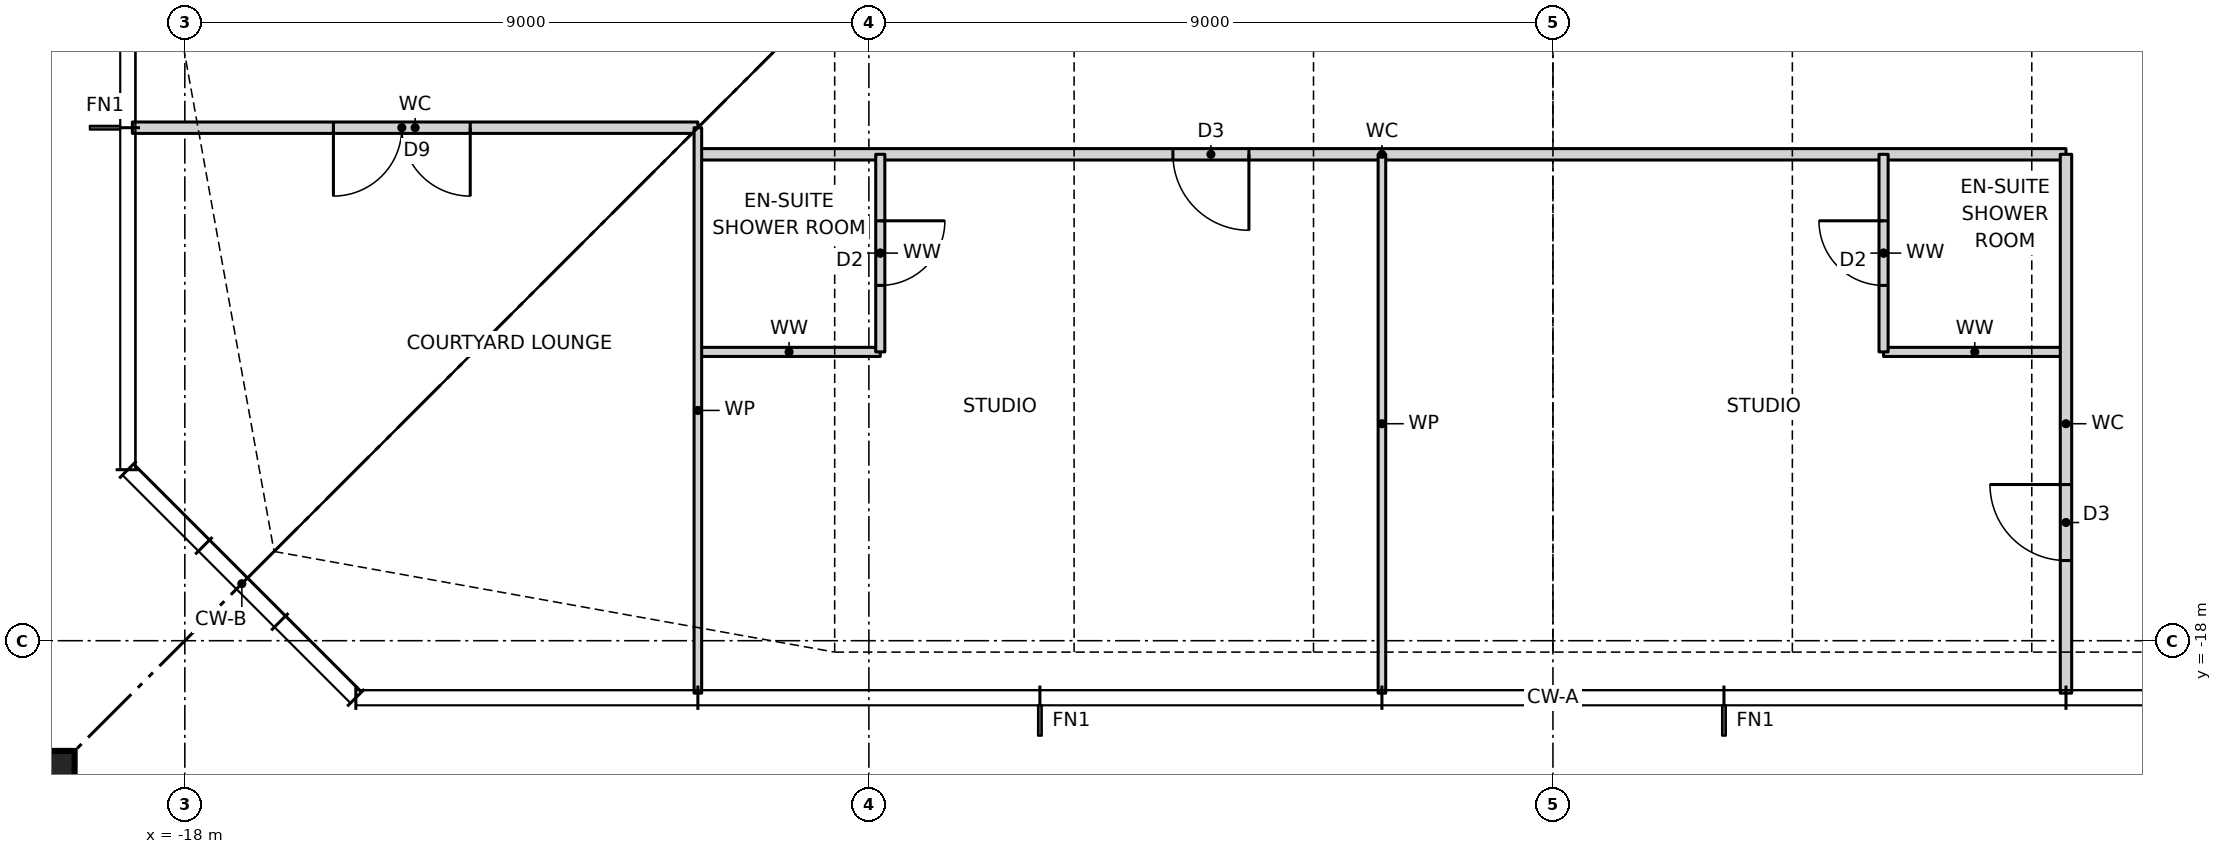
"""IFC4 building model, lengths in metres.
Left out: names, types, materials, properties, quantities, classifications, styles, units other than length and angle.
Written with IfcOpenShell. Run it as: python <this file> out.ifc"""

import sys

from ifc_helpers import new_model, si_unit, direction, frame, frame_2d, origin, origin_2d, place, context, subcontext, project, spatial, rectangle, i_section, extrude, element, fill, save


model = new_model("IFC4")
c1 = context("Model", 3, precision=1e-05, world=origin(), true_north=direction((0.0, 1.0)))
c2 = subcontext(c1, "Body", "Model", "MODEL_VIEW")
j1 = project(units=[si_unit("LENGTHUNIT", "METRE"), si_unit("PLANEANGLEUNIT", "RADIAN")], contexts=[c1])
p1 = place(None, origin())
s1 = spatial("IfcSite", under=j1, at=p1, CompositionType="ELEMENT")
p2 = place(p1, origin())
s2 = spatial("IfcBuilding", under=s1, at=p2, CompositionType="ELEMENT")
p3 = place(p2, frame((0.0, 0.0, 205.5)))
s3 = spatial("IfcBuildingStorey", under=s2, at=p3, CompositionType="ELEMENT", Elevation=205.5)
p4 = place(p3, frame((-21.65, -21.65, 0.0), z_axis=(0.0, 0.0, 1.0), x_axis=(1.0, 0.0, 0.0)))
e1 = element("IfcColumn", 1, at=p4, inside=s3, PredefinedType="COLUMN", context=c2, shape_type="SweptSolid", body=[
    extrude(rectangle(XDim=4.4, YDim=4.4, at=origin_2d()), origin(), (0.0, 0.0, 1.0), 3.5),
    extrude(i_section(OverallWidth=0.478, OverallDepth=0.599, WebThickness=0.1, FlangeThickness=0.14, at=origin_2d()), origin(), (0.0, 0.0, 1.0), 3.5),
])
for number, where, z_axis, x_axis in (
    (2, (-11.25, -14.2, 0.0), (0.0, 0.0, 1.0), (1.0, 0.0, 0.0)),
    (3, (4.35, -14.2, 0.0), (0.0, 0.0, 1.0), (1.0, 0.0, 0.0)),
):
    element("IfcWall", number, at=place(p3, frame(where, z_axis=z_axis, x_axis=x_axis)), inside=s3, PredefinedType="PARTITIONING", context=c2, shape_type="SweptSolid", body=[
        extrude(rectangle(XDim=2.4, YDim=0.12, at=frame_2d((1.2, 0.0))), origin(), (0.0, 0.0, 1.0), 3.2),
    ])
p5 = place(p3, frame((-11.25, -11.6, 0.0), z_axis=(0.0, 0.0, 1.0), x_axis=(1.0, 0.0, 0.0)))
e4 = element("IfcWall", 4, at=p5, inside=s3, PredefinedType="PARTITIONING", context=c2, shape_type="SweptSolid", body=[
    extrude(rectangle(XDim=18.0, YDim=0.15, at=frame_2d((9.0, 0.0))), origin(), (0.0, 0.0, 1.0), 3.2),
])
p6 = place(p5, frame((6.25, 0.0, 0.0)))
e5 = element("IfcOpeningElement", 5, at=p6, cuts=e4, PredefinedType="OPENING", context=c2, shape_type="SweptSolid", body=[
    extrude(rectangle(XDim=1.0, YDim=2.1, at=frame_2d((0.5, 1.05))), frame((0.0, 0.085, 0.0), z_axis=(0.0, -1.0, 0.0), x_axis=(1.0, 0.0, 0.0)), (0.0, 0.0, 1.0), 0.17),
])
p7 = place(p3, frame((-18.69, -11.25, 0.0), z_axis=(0.0, 0.0, 1.0), x_axis=(1.0, 0.0, 0.0)))
e6 = element("IfcWall", 6, at=p7, inside=s3, PredefinedType="PARTITIONING", context=c2, shape_type="SweptSolid", body=[
    extrude(rectangle(XDim=7.44, YDim=0.15, at=frame_2d((3.72, 0.0))), origin(), (0.0, 0.0, 1.0), 3.2),
])
p8 = place(p7, frame((2.645, 0.0, 0.0)))
e7 = element("IfcOpeningElement", 7, at=p8, cuts=e6, PredefinedType="OPENING", context=c2, shape_type="SweptSolid", body=[
    extrude(rectangle(XDim=1.8, YDim=2.1, at=frame_2d((0.9, 1.05))), frame((0.0, 0.085, 0.0), z_axis=(0.0, -1.0, 0.0), x_axis=(1.0, 0.0, 0.0)), (0.0, 0.0, 1.0), 0.17),
])
p9 = place(p3, frame((6.75, -18.69, 0.0), z_axis=(0.0, 0.0, 1.0), x_axis=(0.0, 1.0, 0.0)))
e8 = element("IfcWall", 8, at=p9, inside=s3, PredefinedType="PARTITIONING", context=c2, shape_type="SweptSolid", body=[
    extrude(rectangle(XDim=7.09, YDim=0.15, at=frame_2d((3.545, 0.0))), origin(), (0.0, 0.0, 1.0), 3.2),
])
p10 = place(p9, frame((1.745, 0.0, 0.0)))
e9 = element("IfcOpeningElement", 9, at=p10, cuts=e8, PredefinedType="OPENING", context=c2, shape_type="SweptSolid", body=[
    extrude(rectangle(XDim=1.0, YDim=2.1, at=frame_2d((0.5, 1.05))), frame((0.0, 0.085, 0.0), z_axis=(0.0, -1.0, 0.0), x_axis=(1.0, 0.0, 0.0)), (0.0, 0.0, 1.0), 0.17),
])
p11 = place(p3, frame((4.35, -14.2, 0.0), z_axis=(0.0, 0.0, 1.0), x_axis=(0.0, 1.0, 0.0)))
e10 = element("IfcWall", 10, at=p11, inside=s3, PredefinedType="PARTITIONING", context=c2, shape_type="SweptSolid", body=[
    extrude(rectangle(XDim=2.6, YDim=0.12, at=frame_2d((1.3, 0.0))), origin(), (0.0, 0.0, 1.0), 3.2),
])
p12 = place(p11, frame((0.875, 0.0, 0.0)))
e11 = element("IfcOpeningElement", 11, at=p12, cuts=e10, PredefinedType="OPENING", context=c2, shape_type="SweptSolid", body=[
    extrude(rectangle(XDim=0.85, YDim=2.1, at=frame_2d((0.425, 1.05))), frame((0.0, 0.07, 0.0), z_axis=(0.0, -1.0, 0.0), x_axis=(1.0, 0.0, 0.0)), (0.0, 0.0, 1.0), 0.14),
])
p13 = place(p3, frame((-2.25, -18.69, 0.0), z_axis=(0.0, 0.0, 1.0), x_axis=(0.0, 1.0, 0.0)))
e12 = element("IfcWall", 12, at=p13, inside=s3, PredefinedType="PARTITIONING", context=c2, shape_type="SweptSolid", body=[
    extrude(rectangle(XDim=7.09, YDim=0.1, at=frame_2d((3.545, 0.0))), origin(), (0.0, 0.0, 1.0), 3.2),
])
p14 = place(p3, frame((-8.85, -14.2, 0.0), z_axis=(0.0, 0.0, 1.0), x_axis=(0.0, 1.0, 0.0)))
e13 = element("IfcWall", 13, at=p14, inside=s3, PredefinedType="PARTITIONING", context=c2, shape_type="SweptSolid", body=[
    extrude(rectangle(XDim=2.6, YDim=0.12, at=frame_2d((1.3, 0.0))), origin(), (0.0, 0.0, 1.0), 3.2),
])
p15 = place(p14, frame((0.875, 0.0, 0.0)))
e14 = element("IfcOpeningElement", 14, at=p15, cuts=e13, PredefinedType="OPENING", context=c2, shape_type="SweptSolid", body=[
    extrude(rectangle(XDim=0.85, YDim=2.1, at=frame_2d((0.425, 1.05))), frame((0.0, 0.07, 0.0), z_axis=(0.0, -1.0, 0.0), x_axis=(1.0, 0.0, 0.0)), (0.0, 0.0, 1.0), 0.14),
])
p16 = place(p3, frame((-11.25, -18.69, 0.0), z_axis=(0.0, 0.0, 1.0), x_axis=(0.0, 1.0, 0.0)))
e15 = element("IfcWall", 15, at=p16, inside=s3, PredefinedType="PARTITIONING", context=c2, shape_type="SweptSolid", body=[
    extrude(rectangle(XDim=7.44, YDim=0.1, at=frame_2d((3.72, 0.0))), origin(), (0.0, 0.0, 1.0), 3.2),
])
p17 = place(p6, frame((1.0, 0.0, 0.0), z_axis=(0.0, 0.0, 1.0), x_axis=(-1.0, 0.0, 0.0)))
e16 = element("IfcDoor", 16, at=p17, inside=s3, OperationType="SINGLE_SWING_LEFT", PredefinedType="DOOR", context=c2, shape_type="SweptSolid", body=[
    extrude(rectangle(XDim=1.0, YDim=2.1, at=frame_2d((0.5, 1.05))), frame((0.0, 0.025, 0.0), z_axis=(0.0, -1.0, 0.0), x_axis=(1.0, 0.0, 0.0)), (0.0, 0.0, 1.0), 0.05),
])
fill(e5, e16)
p18 = place(p15, frame((0.85, 0.0, 0.0), z_axis=(0.0, 0.0, 1.0), x_axis=(-1.0, 0.0, 0.0)))
e17 = element("IfcDoor", 17, at=p18, inside=s3, OperationType="SINGLE_SWING_LEFT", PredefinedType="DOOR", context=c2, shape_type="SweptSolid", body=[
    extrude(rectangle(XDim=0.85, YDim=2.1, at=frame_2d((0.425, 1.05))), frame((0.0, 0.025, 0.0), z_axis=(0.0, -1.0, 0.0), x_axis=(1.0, 0.0, 0.0)), (0.0, 0.0, 1.0), 0.05),
])
fill(e14, e17)
p19 = place(p10, origin())
e18 = element("IfcDoor", 18, at=p19, inside=s3, OperationType="SINGLE_SWING_RIGHT", PredefinedType="DOOR", context=c2, shape_type="SweptSolid", body=[
    extrude(rectangle(XDim=1.0, YDim=2.1, at=frame_2d((0.5, 1.05))), frame((0.0, 0.025, 0.0), z_axis=(0.0, -1.0, 0.0), x_axis=(1.0, 0.0, 0.0)), (0.0, 0.0, 1.0), 0.05),
])
fill(e9, e18)
p20 = place(p12, origin())
e19 = element("IfcDoor", 19, at=p20, inside=s3, OperationType="SINGLE_SWING_RIGHT", PredefinedType="DOOR", context=c2, shape_type="SweptSolid", body=[
    extrude(rectangle(XDim=0.85, YDim=2.1, at=frame_2d((0.425, 1.05))), frame((0.0, 0.025, 0.0), z_axis=(0.0, -1.0, 0.0), x_axis=(1.0, 0.0, 0.0)), (0.0, 0.0, 1.0), 0.05),
])
fill(e11, e19)
p21 = place(p8, frame((1.8, 0.0, 0.0), z_axis=(0.0, 0.0, 1.0), x_axis=(-1.0, 0.0, 0.0)))
e20 = element("IfcDoor", 20, at=p21, inside=s3, OperationType="DOUBLE_DOOR_SINGLE_SWING", PredefinedType="DOOR", context=c2, shape_type="SweptSolid", body=[
    extrude(rectangle(XDim=1.8, YDim=2.1, at=frame_2d((0.9, 1.05))), frame((0.0, 0.025, 0.0), z_axis=(0.0, -1.0, 0.0), x_axis=(1.0, 0.0, 0.0)), (0.0, 0.0, 1.0), 0.05),
])
fill(e7, e20)
save(model, sys.argv[1])
